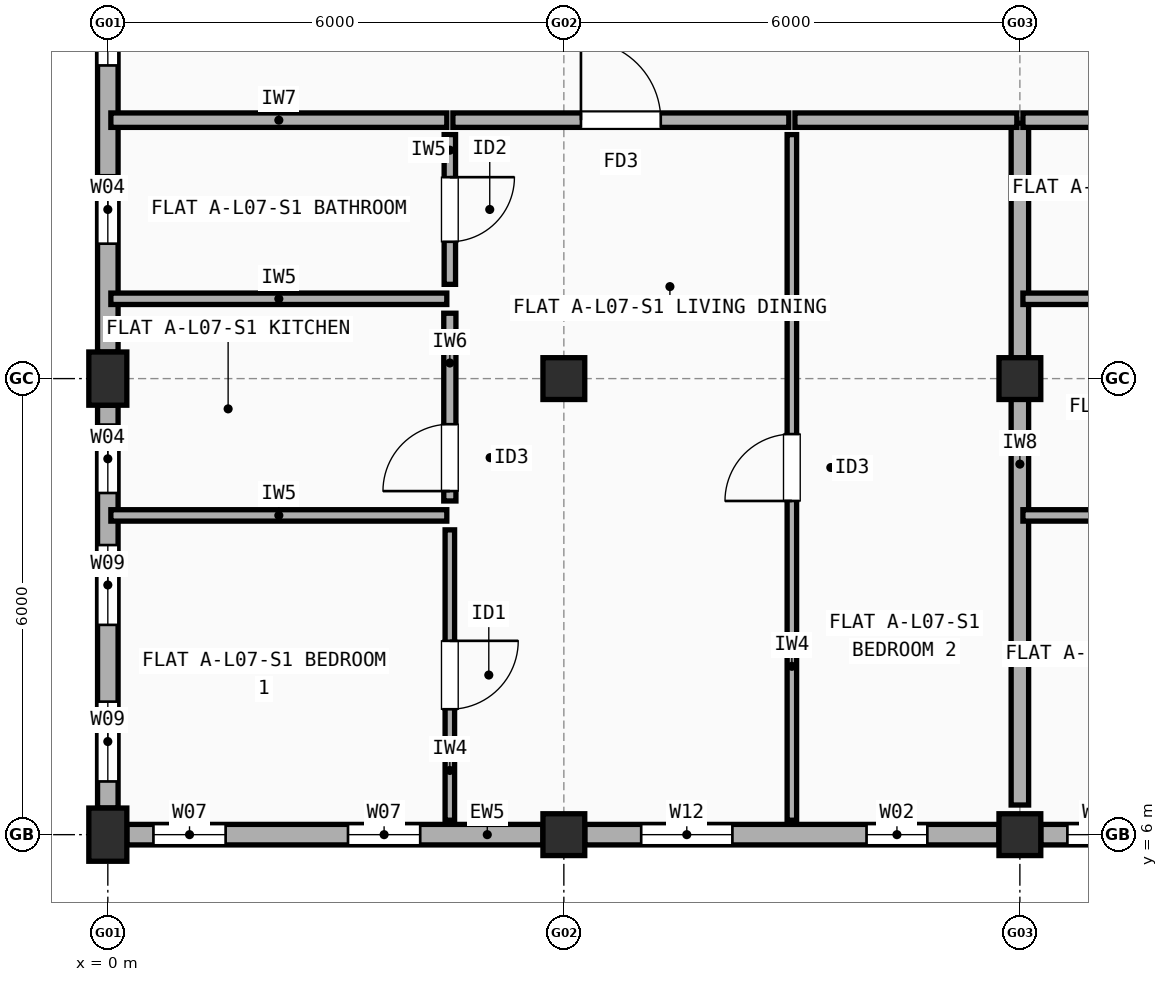
"""IFC4 building model, lengths in metres.
Left out: names, types, materials, properties, quantities, classifications, styles, units other than length and angle.
Written with IfcOpenShell. Run it as: python <this file> out.ifc"""

import sys

from ifc_helpers import new_model, si_unit, direction, frame, frame_2d, origin, origin_2d, place, context, subcontext, project, spatial, rectangle, extrude, element, fill, save


model = new_model("IFC4")
c1 = context("Model", 3, precision=1e-05, world=origin(), true_north=direction((0.0, 1.0)))
c2 = subcontext(c1, "Body", "Model", "MODEL_VIEW")
j1 = project(units=[si_unit("LENGTHUNIT", "METRE"), si_unit("PLANEANGLEUNIT", "RADIAN")], contexts=[c1])
p1 = place(None, origin())
s1 = spatial("IfcSite", under=j1, at=p1, CompositionType="ELEMENT")
p2 = place(p1, origin())
s2 = spatial("IfcBuilding", under=s1, at=p2, CompositionType="ELEMENT")
p3 = place(p2, frame((0.0, 0.0, 23.7)))
s3 = spatial("IfcBuildingStorey", under=s2, at=p3, CompositionType="ELEMENT", Elevation=23.7)
for number, where, z_axis, x_axis in (
    (1, (0.0, 6.0, 0.0), (0.0, 0.0, 1.0), (1.0, 0.0, 0.0)),
    (2, (0.0, 12.0, 0.0), (0.0, 0.0, 1.0), (1.0, 0.0, 0.0)),
):
    element("IfcColumn", number, at=place(p3, frame(where, z_axis=z_axis, x_axis=x_axis)), inside=s3, PredefinedType="COLUMN", context=c2, shape_type="SweptSolid", body=[
        extrude(rectangle(XDim=0.5, YDim=0.7, at=origin_2d()), origin(), (0.0, 0.0, 1.0), 2.975),
    ])
for number, where, z_axis, x_axis in (
    (3, (6.0, 6.0, 0.0), (0.0, 0.0, 1.0), (1.0, 0.0, 0.0)),
    (4, (6.0, 12.0, 0.0), (0.0, 0.0, 1.0), (1.0, 0.0, 0.0)),
    (5, (12.0, 6.0, 0.0), (0.0, 0.0, 1.0), (1.0, 0.0, 0.0)),
    (6, (12.0, 12.0, 0.0), (0.0, 0.0, 1.0), (1.0, 0.0, 0.0)),
):
    element("IfcColumn", number, at=place(p3, frame(where, z_axis=z_axis, x_axis=x_axis)), inside=s3, PredefinedType="COLUMN", context=c2, shape_type="SweptSolid", body=[
        extrude(rectangle(XDim=0.55, YDim=0.55, at=origin_2d()), origin(), (0.0, 0.0, 1.0), 2.975),
    ])
p4 = place(p3, frame((0.25, 6.0, 0.0), z_axis=(0.0, 0.0, 1.0), x_axis=(1.0, 0.0, 0.0)))
e7 = element("IfcWall", 7, at=p4, inside=s3, PredefinedType="STANDARD", context=c2, shape_type="SweptSolid", body=[
    extrude(rectangle(XDim=5.475, YDim=0.27, at=frame_2d((2.738, 0.0))), origin(), (0.0, 0.0, 1.0), 2.457),
])
p5 = place(p4, frame((0.35, 0.0, 0.9)))
e8 = element("IfcOpeningElement", 8, at=p5, cuts=e7, PredefinedType="OPENING", context=c2, shape_type="SweptSolid", body=[
    extrude(rectangle(XDim=0.95, YDim=1.35, at=frame_2d((0.475, 0.675))), frame((0.0, 0.145, 0.0), z_axis=(0.0, -1.0, 0.0), x_axis=(1.0, 0.0, 0.0)), (0.0, 0.0, 1.0), 0.29),
])
p6 = place(p4, frame((2.91, 0.0, 0.9)))
e9 = element("IfcOpeningElement", 9, at=p6, cuts=e7, PredefinedType="OPENING", context=c2, shape_type="SweptSolid", body=[
    extrude(rectangle(XDim=0.95, YDim=1.35, at=frame_2d((0.475, 0.675))), frame((0.0, 0.145, 0.0), z_axis=(0.0, -1.0, 0.0), x_axis=(1.0, 0.0, 0.0)), (0.0, 0.0, 1.0), 0.29),
])
p7 = place(p3, frame((6.275, 6.0, 0.0), z_axis=(0.0, 0.0, 1.0), x_axis=(1.0, 0.0, 0.0)))
e10 = element("IfcWall", 10, at=p7, inside=s3, PredefinedType="STANDARD", context=c2, shape_type="SweptSolid", body=[
    extrude(rectangle(XDim=5.45, YDim=0.27, at=frame_2d((2.725, 0.0))), origin(), (0.0, 0.0, 1.0), 2.457),
])
p8 = place(p7, frame((0.742, 0.0, 0.9)))
e11 = element("IfcOpeningElement", 11, at=p8, cuts=e10, PredefinedType="OPENING", context=c2, shape_type="SweptSolid", body=[
    extrude(rectangle(XDim=1.2, YDim=1.35, at=frame_2d((0.6, 0.675))), frame((0.0, 0.145, 0.0), z_axis=(0.0, -1.0, 0.0), x_axis=(1.0, 0.0, 0.0)), (0.0, 0.0, 1.0), 0.29),
])
p9 = place(p7, frame((3.708, 0.0, 0.9)))
e12 = element("IfcOpeningElement", 12, at=p9, cuts=e10, PredefinedType="OPENING", context=c2, shape_type="SweptSolid", body=[
    extrude(rectangle(XDim=0.8, YDim=1.2, at=frame_2d((0.4, 0.6))), frame((0.0, 0.145, 0.0), z_axis=(0.0, -1.0, 0.0), x_axis=(1.0, 0.0, 0.0)), (0.0, 0.0, 1.0), 0.29),
])
p10 = place(p3, frame((12.275, 6.0, 0.0), z_axis=(0.0, 0.0, 1.0), x_axis=(1.0, 0.0, 0.0)))
e13 = element("IfcWall", 13, at=p10, inside=s3, PredefinedType="STANDARD", context=c2, shape_type="SweptSolid", body=[
    extrude(rectangle(XDim=5.45, YDim=0.27, at=frame_2d((2.725, 0.0))), origin(), (0.0, 0.0, 1.0), 2.457),
])
p11 = place(p10, frame((0.35, 0.0, 0.9)))
e14 = element("IfcOpeningElement", 14, at=p11, cuts=e13, PredefinedType="OPENING", context=c2, shape_type="SweptSolid", body=[
    extrude(rectangle(XDim=0.85, YDim=1.25, at=frame_2d((0.425, 0.625))), frame((0.0, 0.145, 0.0), z_axis=(0.0, -1.0, 0.0), x_axis=(1.0, 0.0, 0.0)), (0.0, 0.0, 1.0), 0.29),
])
p12 = place(p10, frame((2.985, 0.0, 0.9)))
e15 = element("IfcOpeningElement", 15, at=p12, cuts=e13, PredefinedType="OPENING", context=c2, shape_type="SweptSolid", body=[
    extrude(rectangle(XDim=0.85, YDim=1.25, at=frame_2d((0.425, 0.625))), frame((0.0, 0.145, 0.0), z_axis=(0.0, -1.0, 0.0), x_axis=(1.0, 0.0, 0.0)), (0.0, 0.0, 1.0), 0.29),
])
p13 = place(p3, frame((0.0, 17.65, 0.0), z_axis=(0.0, 0.0, 1.0), x_axis=(0.0, -1.0, 0.0)))
e16 = element("IfcWall", 16, at=p13, inside=s3, PredefinedType="STANDARD", context=c2, shape_type="SweptSolid", body=[
    extrude(rectangle(XDim=5.3, YDim=0.27, at=frame_2d((2.65, 0.0))), origin(), (0.0, 0.0, 1.0), 2.457),
])
p14 = place(p13, frame((0.68, 0.0, 0.9)))
e17 = element("IfcOpeningElement", 17, at=p14, cuts=e16, PredefinedType="OPENING", context=c2, shape_type="SweptSolid", body=[
    extrude(rectangle(XDim=0.85, YDim=1.25, at=frame_2d((0.425, 0.625))), frame((0.0, 0.145, 0.0), z_axis=(0.0, -1.0, 0.0), x_axis=(1.0, 0.0, 0.0)), (0.0, 0.0, 1.0), 0.29),
])
p15 = place(p13, frame((2.975, 0.0, 0.9)))
e18 = element("IfcOpeningElement", 18, at=p15, cuts=e16, PredefinedType="OPENING", context=c2, shape_type="SweptSolid", body=[
    extrude(rectangle(XDim=0.9, YDim=1.3, at=frame_2d((0.45, 0.65))), frame((0.0, 0.145, 0.0), z_axis=(0.0, -1.0, 0.0), x_axis=(1.0, 0.0, 0.0)), (0.0, 0.0, 1.0), 0.29),
])
p16 = place(p3, frame((0.0, 11.65, 0.0), z_axis=(0.0, 0.0, 1.0), x_axis=(0.0, -1.0, 0.0)))
e19 = element("IfcWall", 19, at=p16, inside=s3, PredefinedType="STANDARD", context=c2, shape_type="SweptSolid", body=[
    extrude(rectangle(XDim=5.3, YDim=0.27, at=frame_2d((2.65, 0.0))), origin(), (0.0, 0.0, 1.0), 2.457),
])
p17 = place(p16, frame((0.255, 0.0, 0.9)))
e20 = element("IfcOpeningElement", 20, at=p17, cuts=e19, PredefinedType="OPENING", context=c2, shape_type="SweptSolid", body=[
    extrude(rectangle(XDim=0.9, YDim=1.3, at=frame_2d((0.45, 0.65))), frame((0.0, 0.145, 0.0), z_axis=(0.0, -1.0, 0.0), x_axis=(1.0, 0.0, 0.0)), (0.0, 0.0, 1.0), 0.29),
])
p18 = place(p16, frame((1.84, 0.0, 0.9)))
e21 = element("IfcOpeningElement", 21, at=p18, cuts=e19, PredefinedType="OPENING", context=c2, shape_type="SweptSolid", body=[
    extrude(rectangle(XDim=1.05, YDim=1.35, at=frame_2d((0.525, 0.675))), frame((0.0, 0.145, 0.0), z_axis=(0.0, -1.0, 0.0), x_axis=(1.0, 0.0, 0.0)), (0.0, 0.0, 1.0), 0.29),
])
p19 = place(p16, frame((3.9, 0.0, 0.9)))
e22 = element("IfcOpeningElement", 22, at=p19, cuts=e19, PredefinedType="OPENING", context=c2, shape_type="SweptSolid", body=[
    extrude(rectangle(XDim=1.05, YDim=1.35, at=frame_2d((0.525, 0.675))), frame((0.0, 0.145, 0.0), z_axis=(0.0, -1.0, 0.0), x_axis=(1.0, 0.0, 0.0)), (0.0, 0.0, 1.0), 0.29),
])
p20 = place(p3, frame((12.0, 6.39, 0.0), z_axis=(0.0, 0.0, 1.0), x_axis=(0.0, 1.0, 0.0)))
e23 = element("IfcWall", 23, at=p20, inside=s3, PredefinedType="SOLIDWALL", context=c2, shape_type="SweptSolid", body=[
    extrude(rectangle(XDim=8.97, YDim=0.23, at=frame_2d((4.485, 0.0))), origin(), (0.0, 0.0, 1.0), 2.458),
])
p21 = place(p3, frame((0.04, 15.4, 0.0), z_axis=(0.0, 0.0, 1.0), x_axis=(1.0, 0.0, 0.0)))
e24 = element("IfcWall", 24, at=p21, inside=s3, PredefinedType="SOLIDWALL", context=c2, shape_type="SweptSolid", body=[
    extrude(rectangle(XDim=4.42, YDim=0.19, at=frame_2d((2.21, 0.0))), origin(), (0.0, 0.0, 1.0), 2.457),
])
p22 = place(p3, frame((4.54, 15.4, 0.0), z_axis=(0.0, 0.0, 1.0), x_axis=(1.0, 0.0, 0.0)))
e25 = element("IfcWall", 25, at=p22, inside=s3, PredefinedType="SOLIDWALL", context=c2, shape_type="SweptSolid", body=[
    extrude(rectangle(XDim=4.42, YDim=0.19, at=frame_2d((2.21, 0.0))), origin(), (0.0, 0.0, 1.0), 2.458),
])
p23 = place(p22, frame((1.685, 0.0, 0.0)))
e26 = element("IfcOpeningElement", 26, at=p23, cuts=e25, PredefinedType="OPENING", context=c2, shape_type="SweptSolid", body=[
    extrude(rectangle(XDim=1.05, YDim=2.15, at=frame_2d((0.525, 1.075))), frame((0.0, 0.105, 0.0), z_axis=(0.0, -1.0, 0.0), x_axis=(1.0, 0.0, 0.0)), (0.0, 0.0, 1.0), 0.21),
])
p24 = place(p3, frame((4.5, 6.19, 0.0), z_axis=(0.0, 0.0, 1.0), x_axis=(0.0, 1.0, 0.0)))
e27 = element("IfcWall", 27, at=p24, inside=s3, PredefinedType="PARTITIONING", context=c2, shape_type="SweptSolid", body=[
    extrude(rectangle(XDim=3.82, YDim=0.125, at=frame_2d((1.91, 0.0))), origin(), (0.0, 0.0, 1.0), 2.975),
])
p25 = place(p24, frame((1.46, 0.0, 0.0)))
e28 = element("IfcOpeningElement", 28, at=p25, cuts=e27, PredefinedType="OPENING", context=c2, shape_type="SweptSolid", body=[
    extrude(rectangle(XDim=0.9, YDim=2.1, at=frame_2d((0.45, 1.05))), frame((0.0, 0.073, 0.0), z_axis=(0.0, -1.0, 0.0), x_axis=(1.0, 0.0, 0.0)), (0.0, 0.0, 1.0), 0.145),
])
p26 = place(p3, frame((4.5, 10.39, 0.0), z_axis=(0.0, 0.0, 1.0), x_axis=(0.0, 1.0, 0.0)))
e29 = element("IfcWall", 29, at=p26, inside=s3, PredefinedType="PLUMBINGWALL", context=c2, shape_type="SweptSolid", body=[
    extrude(rectangle(XDim=2.47, YDim=0.16, at=frame_2d((1.235, 0.0))), origin(), (0.0, 0.0, 1.0), 2.408),
])
p27 = place(p26, frame((0.13, 0.0, 0.0)))
e30 = element("IfcOpeningElement", 30, at=p27, cuts=e29, PredefinedType="OPENING", context=c2, shape_type="SweptSolid", body=[
    extrude(rectangle(XDim=0.88, YDim=2.1, at=frame_2d((0.44, 1.05))), frame((0.0, 0.09, 0.0), z_axis=(0.0, -1.0, 0.0), x_axis=(1.0, 0.0, 0.0)), (0.0, 0.0, 1.0), 0.18),
])
p28 = place(p3, frame((4.5, 13.24, 0.0), z_axis=(0.0, 0.0, 1.0), x_axis=(0.0, 1.0, 0.0)))
e31 = element("IfcWall", 31, at=p28, inside=s3, PredefinedType="PARTITIONING", context=c2, shape_type="SweptSolid", body=[
    extrude(rectangle(XDim=1.97, YDim=0.15, at=frame_2d((0.985, 0.0))), origin(), (0.0, 0.0, 1.0), 2.975),
])
p29 = place(p28, frame((0.56, 0.0, 0.0)))
e32 = element("IfcOpeningElement", 32, at=p29, cuts=e31, PredefinedType="OPENING", context=c2, shape_type="SweptSolid", body=[
    extrude(rectangle(XDim=0.85, YDim=2.1, at=frame_2d((0.425, 1.05))), frame((0.0, 0.085, 0.0), z_axis=(0.0, -1.0, 0.0), x_axis=(1.0, 0.0, 0.0)), (0.0, 0.0, 1.0), 0.17),
])
for number, where, z_axis, x_axis in (
    (33, (0.04, 10.2, 0.0), (0.0, 0.0, 1.0), (1.0, 0.0, 0.0)),
    (34, (0.04, 13.05, 0.0), (0.0, 0.0, 1.0), (1.0, 0.0, 0.0)),
):
    element("IfcWall", number, at=place(p3, frame(where, z_axis=z_axis, x_axis=x_axis)), inside=s3, PredefinedType="PARTITIONING", context=c2, shape_type="SweptSolid", body=[
        extrude(rectangle(XDim=4.42, YDim=0.15, at=frame_2d((2.21, 0.0))), origin(), (0.0, 0.0, 1.0), 2.457),
    ])
p30 = place(p3, frame((9.04, 15.4, 0.0), z_axis=(0.0, 0.0, 1.0), x_axis=(1.0, 0.0, 0.0)))
e35 = element("IfcWall", 35, at=p30, inside=s3, PredefinedType="SOLIDWALL", context=c2, shape_type="SweptSolid", body=[
    extrude(rectangle(XDim=2.92, YDim=0.19, at=frame_2d((1.46, 0.0))), origin(), (0.0, 0.0, 1.0), 2.458),
])
p31 = place(p3, frame((9.0, 6.19, 0.0), z_axis=(0.0, 0.0, 1.0), x_axis=(0.0, 1.0, 0.0)))
e36 = element("IfcWall", 36, at=p31, inside=s3, PredefinedType="PARTITIONING", context=c2, shape_type="SweptSolid", body=[
    extrude(rectangle(XDim=9.02, YDim=0.125, at=frame_2d((4.51, 0.0))), origin(), (0.0, 0.0, 1.0), 2.548),
])
p32 = place(p31, frame((4.2, 0.0, 0.0)))
e37 = element("IfcOpeningElement", 37, at=p32, cuts=e36, PredefinedType="OPENING", context=c2, shape_type="SweptSolid", body=[
    extrude(rectangle(XDim=0.88, YDim=2.1, at=frame_2d((0.44, 1.05))), frame((0.0, 0.073, 0.0), z_axis=(0.0, -1.0, 0.0), x_axis=(1.0, 0.0, 0.0)), (0.0, 0.0, 1.0), 0.145),
])
p33 = place(p3, frame((12.04, 15.4, 0.0), z_axis=(0.0, 0.0, 1.0), x_axis=(1.0, 0.0, 0.0)))
e38 = element("IfcWall", 38, at=p33, inside=s3, PredefinedType="SOLIDWALL", context=c2, shape_type="SweptSolid", body=[
    extrude(rectangle(XDim=4.42, YDim=0.19, at=frame_2d((2.21, 0.0))), origin(), (0.0, 0.0, 1.0), 2.458),
])
p34 = place(p3, frame((12.04, 10.2, 0.0), z_axis=(0.0, 0.0, 1.0), x_axis=(1.0, 0.0, 0.0)))
e39 = element("IfcWall", 39, at=p34, inside=s3, PredefinedType="PARTITIONING", context=c2, shape_type="SweptSolid", body=[
    extrude(rectangle(XDim=4.42, YDim=0.15, at=frame_2d((2.21, 0.0))), origin(), (0.0, 0.0, 1.0), 2.508),
])
p35 = place(p3, frame((12.04, 13.05, 0.0), z_axis=(0.0, 0.0, 1.0), x_axis=(1.0, 0.0, 0.0)))
e40 = element("IfcWall", 40, at=p35, inside=s3, PredefinedType="PARTITIONING", context=c2, shape_type="SweptSolid", body=[
    extrude(rectangle(XDim=4.42, YDim=0.15, at=frame_2d((2.21, 0.0))), origin(), (0.0, 0.0, 1.0), 2.458),
])
p36 = place(p5, origin())
e41 = element("IfcWindow", 41, at=p36, inside=s3, PartitioningType="SINGLE_PANEL", PredefinedType="WINDOW", context=c2, shape_type="SweptSolid", body=[
    extrude(rectangle(XDim=0.95, YDim=1.35, at=frame_2d((0.475, 0.675))), frame((0.0, 0.03, 0.0), z_axis=(0.0, -1.0, 0.0), x_axis=(1.0, 0.0, 0.0)), (0.0, 0.0, 1.0), 0.06),
])
fill(e8, e41)
p37 = place(p6, origin())
e42 = element("IfcWindow", 42, at=p37, inside=s3, PartitioningType="SINGLE_PANEL", PredefinedType="WINDOW", context=c2, shape_type="SweptSolid", body=[
    extrude(rectangle(XDim=0.95, YDim=1.35, at=frame_2d((0.475, 0.675))), frame((0.0, 0.03, 0.0), z_axis=(0.0, -1.0, 0.0), x_axis=(1.0, 0.0, 0.0)), (0.0, 0.0, 1.0), 0.06),
])
fill(e9, e42)
p38 = place(p8, origin())
e43 = element("IfcWindow", 43, at=p38, inside=s3, PartitioningType="SINGLE_PANEL", PredefinedType="WINDOW", context=c2, shape_type="SweptSolid", body=[
    extrude(rectangle(XDim=1.2, YDim=1.35, at=frame_2d((0.6, 0.675))), frame((0.0, 0.03, 0.0), z_axis=(0.0, -1.0, 0.0), x_axis=(1.0, 0.0, 0.0)), (0.0, 0.0, 1.0), 0.06),
])
fill(e11, e43)
p39 = place(p9, origin())
e44 = element("IfcWindow", 44, at=p39, inside=s3, PartitioningType="SINGLE_PANEL", PredefinedType="WINDOW", context=c2, shape_type="SweptSolid", body=[
    extrude(rectangle(XDim=0.8, YDim=1.2, at=frame_2d((0.4, 0.6))), frame((0.0, 0.03, 0.0), z_axis=(0.0, -1.0, 0.0), x_axis=(1.0, 0.0, 0.0)), (0.0, 0.0, 1.0), 0.06),
])
fill(e12, e44)
p40 = place(p11, origin())
e45 = element("IfcWindow", 45, at=p40, inside=s3, PartitioningType="SINGLE_PANEL", PredefinedType="WINDOW", context=c2, shape_type="SweptSolid", body=[
    extrude(rectangle(XDim=0.85, YDim=1.25, at=frame_2d((0.425, 0.625))), frame((0.0, 0.03, 0.0), z_axis=(0.0, -1.0, 0.0), x_axis=(1.0, 0.0, 0.0)), (0.0, 0.0, 1.0), 0.06),
])
fill(e14, e45)
p41 = place(p14, origin())
e46 = element("IfcWindow", 46, at=p41, inside=s3, PartitioningType="SINGLE_PANEL", PredefinedType="WINDOW", context=c2, shape_type="SweptSolid", body=[
    extrude(rectangle(XDim=0.85, YDim=1.25, at=frame_2d((0.425, 0.625))), frame((0.0, 0.03, 0.0), z_axis=(0.0, -1.0, 0.0), x_axis=(1.0, 0.0, 0.0)), (0.0, 0.0, 1.0), 0.06),
])
fill(e17, e46)
p42 = place(p15, origin())
e47 = element("IfcWindow", 47, at=p42, inside=s3, PartitioningType="SINGLE_PANEL", PredefinedType="WINDOW", context=c2, shape_type="SweptSolid", body=[
    extrude(rectangle(XDim=0.9, YDim=1.3, at=frame_2d((0.45, 0.65))), frame((0.0, 0.03, 0.0), z_axis=(0.0, -1.0, 0.0), x_axis=(1.0, 0.0, 0.0)), (0.0, 0.0, 1.0), 0.06),
])
fill(e18, e47)
p43 = place(p17, origin())
e48 = element("IfcWindow", 48, at=p43, inside=s3, PartitioningType="SINGLE_PANEL", PredefinedType="WINDOW", context=c2, shape_type="SweptSolid", body=[
    extrude(rectangle(XDim=0.9, YDim=1.3, at=frame_2d((0.45, 0.65))), frame((0.0, 0.03, 0.0), z_axis=(0.0, -1.0, 0.0), x_axis=(1.0, 0.0, 0.0)), (0.0, 0.0, 1.0), 0.06),
])
fill(e20, e48)
p44 = place(p18, origin())
e49 = element("IfcWindow", 49, at=p44, inside=s3, PartitioningType="SINGLE_PANEL", PredefinedType="WINDOW", context=c2, shape_type="SweptSolid", body=[
    extrude(rectangle(XDim=1.05, YDim=1.35, at=frame_2d((0.525, 0.675))), frame((0.0, 0.03, 0.0), z_axis=(0.0, -1.0, 0.0), x_axis=(1.0, 0.0, 0.0)), (0.0, 0.0, 1.0), 0.06),
])
fill(e21, e49)
p45 = place(p19, origin())
e50 = element("IfcWindow", 50, at=p45, inside=s3, PartitioningType="SINGLE_PANEL", PredefinedType="WINDOW", context=c2, shape_type="SweptSolid", body=[
    extrude(rectangle(XDim=1.05, YDim=1.35, at=frame_2d((0.525, 0.675))), frame((0.0, 0.03, 0.0), z_axis=(0.0, -1.0, 0.0), x_axis=(1.0, 0.0, 0.0)), (0.0, 0.0, 1.0), 0.06),
])
fill(e22, e50)
p46 = place(p23, origin())
e51 = element("IfcDoor", 51, at=p46, inside=s3, OperationType="SINGLE_SWING_LEFT", PredefinedType="DOOR", context=c2, shape_type="SweptSolid", body=[
    extrude(rectangle(XDim=1.05, YDim=2.15, at=frame_2d((0.525, 1.075))), frame((0.0, 0.025, 0.0), z_axis=(0.0, -1.0, 0.0), x_axis=(1.0, 0.0, 0.0)), (0.0, 0.0, 1.0), 0.05),
])
fill(e26, e51)
p47 = place(p25, origin())
e52 = element("IfcDoor", 52, at=p47, inside=s3, OperationType="SINGLE_SWING_RIGHT", PredefinedType="DOOR", context=c2, shape_type="SweptSolid", body=[
    extrude(rectangle(XDim=0.9, YDim=2.1, at=frame_2d((0.45, 1.05))), frame((0.0, 0.025, 0.0), z_axis=(0.0, -1.0, 0.0), x_axis=(1.0, 0.0, 0.0)), (0.0, 0.0, 1.0), 0.05),
])
fill(e28, e52)
p48 = place(p27, origin())
e53 = element("IfcDoor", 53, at=p48, inside=s3, OperationType="SINGLE_SWING_LEFT", PredefinedType="DOOR", context=c2, shape_type="SweptSolid", body=[
    extrude(rectangle(XDim=0.88, YDim=2.1, at=frame_2d((0.44, 1.05))), frame((0.0, 0.025, 0.0), z_axis=(0.0, -1.0, 0.0), x_axis=(1.0, 0.0, 0.0)), (0.0, 0.0, 1.0), 0.05),
])
fill(e30, e53)
p49 = place(p29, origin())
e54 = element("IfcDoor", 54, at=p49, inside=s3, OperationType="SINGLE_SWING_RIGHT", PredefinedType="DOOR", context=c2, shape_type="SweptSolid", body=[
    extrude(rectangle(XDim=0.85, YDim=2.1, at=frame_2d((0.425, 1.05))), frame((0.0, 0.025, 0.0), z_axis=(0.0, -1.0, 0.0), x_axis=(1.0, 0.0, 0.0)), (0.0, 0.0, 1.0), 0.05),
])
fill(e32, e54)
p50 = place(p32, origin())
e55 = element("IfcDoor", 55, at=p50, inside=s3, OperationType="SINGLE_SWING_LEFT", PredefinedType="DOOR", context=c2, shape_type="SweptSolid", body=[
    extrude(rectangle(XDim=0.88, YDim=2.1, at=frame_2d((0.44, 1.05))), frame((0.0, 0.025, 0.0), z_axis=(0.0, -1.0, 0.0), x_axis=(1.0, 0.0, 0.0)), (0.0, 0.0, 1.0), 0.05),
])
fill(e37, e55)
save(model, sys.argv[1])
